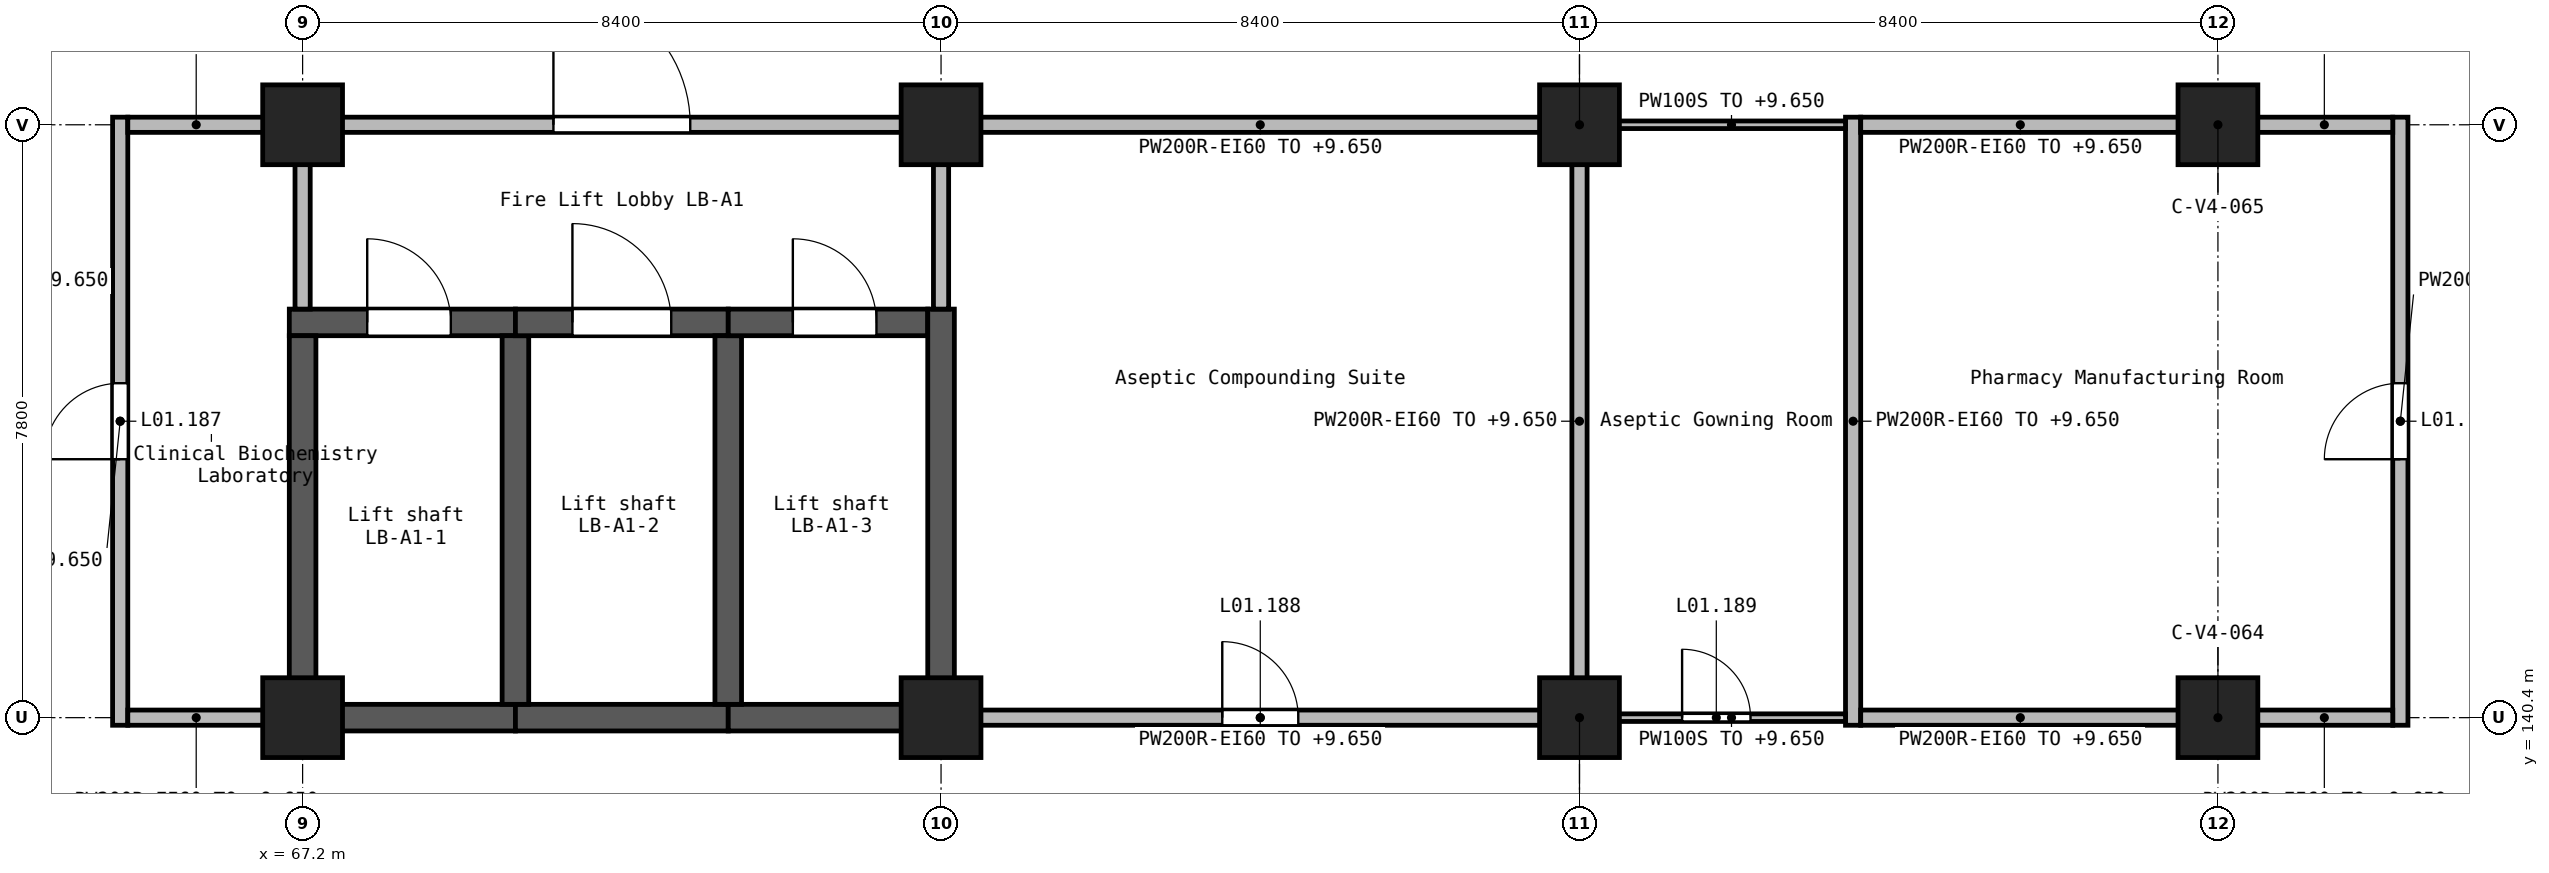
"""IFC4 building model, lengths in metres.
Left out: names, types, materials, properties, quantities, classifications, styles, units other than length and angle.
Written with IfcOpenShell. Run it as: python <this file> out.ifc"""

import sys

from ifc_helpers import new_model, si_unit, direction, frame, frame_2d, origin, origin_2d, place, context, subcontext, project, spatial, rectangle, extrude, element, fill, save


model = new_model("IFC4")
c1 = context("Model", 3, precision=1e-05, world=origin(), true_north=direction((0.0, 1.0)))
c2 = subcontext(c1, "Body", "Model", "MODEL_VIEW")
j1 = project(units=[si_unit("LENGTHUNIT", "METRE"), si_unit("PLANEANGLEUNIT", "RADIAN")], contexts=[c1])
p1 = place(None, origin())
s1 = spatial("IfcSite", under=j1, at=p1, CompositionType="ELEMENT")
p2 = place(p1, origin())
s2 = spatial("IfcBuilding", under=s1, at=p2, CompositionType="ELEMENT")
p3 = place(p2, frame((0.0, 0.0, 5.4)))
s3 = spatial("IfcBuildingStorey", under=s2, at=p3, CompositionType="ELEMENT", Elevation=5.4)
for number, where, z_axis, x_axis in (
    (1, (67.2, 140.4, 0.0), (0.0, 0.0, 1.0), (1.0, 0.0, 0.0)),
    (2, (67.2, 148.2, 0.0), (0.0, 0.0, 1.0), (1.0, 0.0, 0.0)),
    (3, (75.6, 140.4, 0.0), (0.0, 0.0, 1.0), (1.0, 0.0, 0.0)),
    (4, (75.6, 148.2, 0.0), (0.0, 0.0, 1.0), (1.0, 0.0, 0.0)),
    (5, (84.0, 140.4, 0.0), (0.0, 0.0, 1.0), (1.0, 0.0, 0.0)),
    (6, (84.0, 148.2, 0.0), (0.0, 0.0, 1.0), (1.0, 0.0, 0.0)),
    (7, (92.4, 140.4, 0.0), (0.0, 0.0, 1.0), (1.0, 0.0, 0.0)),
    (8, (92.4, 148.2, 0.0), (0.0, 0.0, 1.0), (1.0, 0.0, 0.0)),
):
    element("IfcColumn", number, at=place(p3, frame(where, z_axis=z_axis, x_axis=x_axis)), inside=s3, PredefinedType="COLUMN", context=c2, shape_type="SweptSolid", body=[
        extrude(rectangle(XDim=1.05, YDim=1.05, at=origin_2d()), origin(), (0.0, 0.0, 1.0), 4.5),
    ])
p4 = place(p3, frame((67.025, 145.6, 0.0), z_axis=(0.0, 0.0, 1.0), x_axis=(1.0, 0.0, 0.0)))
e9 = element("IfcWall", 9, at=p4, inside=s3, PredefinedType="SHEAR", context=c2, shape_type="SweptSolid", body=[
    extrude(rectangle(XDim=2.975, YDim=0.35, at=frame_2d((1.488, 0.0))), origin(), (0.0, 0.0, 1.0), 4.5),
])
p5 = place(p4, frame((1.025, 0.0, 0.0)))
e10 = element("IfcOpeningElement", 10, at=p5, cuts=e9, PredefinedType="OPENING", context=c2, shape_type="SweptSolid", body=[
    extrude(rectangle(XDim=1.1, YDim=2.1, at=frame_2d((0.55, 1.05))), frame((0.0, 0.185, 0.0), z_axis=(0.0, -1.0, 0.0), x_axis=(1.0, 0.0, 0.0)), (0.0, 0.0, 1.0), 0.37),
])
p6 = place(p3, frame((67.2, 140.225, 0.0), z_axis=(0.0, 0.0, 1.0), x_axis=(0.0, 1.0, 0.0)))
e11 = element("IfcWall", 11, at=p6, inside=s3, PredefinedType="SHEAR", context=c2, shape_type="SweptSolid", body=[
    extrude(rectangle(XDim=5.2, YDim=0.35, at=frame_2d((2.6, 0.0))), origin(), (0.0, 0.0, 1.0), 4.5),
])
p7 = place(p3, frame((67.375, 140.4, 0.0), z_axis=(0.0, 0.0, 1.0), x_axis=(1.0, 0.0, 0.0)))
e12 = element("IfcWall", 12, at=p7, inside=s3, PredefinedType="SHEAR", context=c2, shape_type="SweptSolid", body=[
    extrude(rectangle(XDim=2.625, YDim=0.35, at=frame_2d((1.312, 0.0))), origin(), (0.0, 0.0, 1.0), 4.5),
])
p8 = place(p3, frame((70.0, 140.4, 0.0), z_axis=(0.0, 0.0, 1.0), x_axis=(1.0, 0.0, 0.0)))
e13 = element("IfcWall", 13, at=p8, inside=s3, PredefinedType="SHEAR", context=c2, shape_type="SweptSolid", body=[
    extrude(rectangle(XDim=2.8, YDim=0.35, at=frame_2d((1.4, 0.0))), origin(), (0.0, 0.0, 1.0), 4.5),
])
p9 = place(p3, frame((70.0, 140.575, 0.0), z_axis=(0.0, 0.0, 1.0), x_axis=(0.0, 1.0, 0.0)))
e14 = element("IfcWall", 14, at=p9, inside=s3, PredefinedType="SHEAR", context=c2, shape_type="SweptSolid", body=[
    extrude(rectangle(XDim=4.85, YDim=0.35, at=frame_2d((2.425, 0.0))), origin(), (0.0, 0.0, 1.0), 4.5),
])
p10 = place(p3, frame((70.0, 145.6, 0.0), z_axis=(0.0, 0.0, 1.0), x_axis=(1.0, 0.0, 0.0)))
e15 = element("IfcWall", 15, at=p10, inside=s3, PredefinedType="SHEAR", context=c2, shape_type="SweptSolid", body=[
    extrude(rectangle(XDim=2.8, YDim=0.35, at=frame_2d((1.4, 0.0))), origin(), (0.0, 0.0, 1.0), 4.5),
])
p11 = place(p10, frame((0.75, 0.0, 0.0)))
e16 = element("IfcOpeningElement", 16, at=p11, cuts=e15, PredefinedType="OPENING", context=c2, shape_type="SweptSolid", body=[
    extrude(rectangle(XDim=1.3, YDim=2.1, at=frame_2d((0.65, 1.05))), frame((0.0, 0.185, 0.0), z_axis=(0.0, -1.0, 0.0), x_axis=(1.0, 0.0, 0.0)), (0.0, 0.0, 1.0), 0.37),
])
p12 = place(p3, frame((72.8, 140.4, 0.0), z_axis=(0.0, 0.0, 1.0), x_axis=(1.0, 0.0, 0.0)))
e17 = element("IfcWall", 17, at=p12, inside=s3, PredefinedType="SHEAR", context=c2, shape_type="SweptSolid", body=[
    extrude(rectangle(XDim=2.625, YDim=0.35, at=frame_2d((1.312, 0.0))), origin(), (0.0, 0.0, 1.0), 4.5),
])
p13 = place(p3, frame((72.8, 140.575, 0.0), z_axis=(0.0, 0.0, 1.0), x_axis=(0.0, 1.0, 0.0)))
e18 = element("IfcWall", 18, at=p13, inside=s3, PredefinedType="SHEAR", context=c2, shape_type="SweptSolid", body=[
    extrude(rectangle(XDim=4.85, YDim=0.35, at=frame_2d((2.425, 0.0))), origin(), (0.0, 0.0, 1.0), 4.5),
])
p14 = place(p3, frame((72.8, 145.6, 0.0), z_axis=(0.0, 0.0, 1.0), x_axis=(1.0, 0.0, 0.0)))
e19 = element("IfcWall", 19, at=p14, inside=s3, PredefinedType="SHEAR", context=c2, shape_type="SweptSolid", body=[
    extrude(rectangle(XDim=2.625, YDim=0.35, at=frame_2d((1.312, 0.0))), origin(), (0.0, 0.0, 1.0), 4.5),
])
p15 = place(p14, frame((0.85, 0.0, 0.0)))
e20 = element("IfcOpeningElement", 20, at=p15, cuts=e19, PredefinedType="OPENING", context=c2, shape_type="SweptSolid", body=[
    extrude(rectangle(XDim=1.1, YDim=2.1, at=frame_2d((0.55, 1.05))), frame((0.0, 0.185, 0.0), z_axis=(0.0, -1.0, 0.0), x_axis=(1.0, 0.0, 0.0)), (0.0, 0.0, 1.0), 0.37),
])
p16 = place(p3, frame((75.6, 140.225, 0.0), z_axis=(0.0, 0.0, 1.0), x_axis=(0.0, 1.0, 0.0)))
e21 = element("IfcWall", 21, at=p16, inside=s3, PredefinedType="SHEAR", context=c2, shape_type="SweptSolid", body=[
    extrude(rectangle(XDim=5.55, YDim=0.35, at=frame_2d((2.775, 0.0))), origin(), (0.0, 0.0, 1.0), 4.5),
])
p17 = place(p3, frame((76.1, 140.4, 0.0), z_axis=(0.0, 0.0, 1.0), x_axis=(1.0, 0.0, 0.0)))
e22 = element("IfcWall", 22, at=p17, inside=s3, PredefinedType="SOLIDWALL", context=c2, shape_type="SweptSolid", body=[
    extrude(rectangle(XDim=7.4, YDim=0.2, at=frame_2d((3.7, 0.0))), origin(), (0.0, 0.0, 1.0), 4.25),
])
p18 = place(p17, frame((3.2, 0.0, 0.0)))
e23 = element("IfcOpeningElement", 23, at=p18, cuts=e22, PredefinedType="OPENING", context=c2, shape_type="SweptSolid", body=[
    extrude(rectangle(XDim=1.0, YDim=2.1, at=frame_2d((0.5, 1.05))), frame((0.0, 0.11, 0.0), z_axis=(0.0, -1.0, 0.0), x_axis=(1.0, 0.0, 0.0)), (0.0, 0.0, 1.0), 0.22),
])
p19 = place(p3, frame((76.1, 148.2, 0.0), z_axis=(0.0, 0.0, 1.0), x_axis=(1.0, 0.0, 0.0)))
e24 = element("IfcWall", 24, at=p19, inside=s3, PredefinedType="SOLIDWALL", context=c2, shape_type="SweptSolid", body=[
    extrude(rectangle(XDim=7.4, YDim=0.2, at=frame_2d((3.7, 0.0))), origin(), (0.0, 0.0, 1.0), 4.25),
])
p20 = place(p3, frame((67.7, 148.2, 0.0), z_axis=(0.0, 0.0, 1.0), x_axis=(1.0, 0.0, 0.0)))
e25 = element("IfcWall", 25, at=p20, inside=s3, PredefinedType="SOLIDWALL", context=c2, shape_type="SweptSolid", body=[
    extrude(rectangle(XDim=7.4, YDim=0.2, at=frame_2d((3.7, 0.0))), origin(), (0.0, 0.0, 1.0), 4.25),
])
p21 = place(p20, frame((2.8, 0.0, 0.0)))
e26 = element("IfcOpeningElement", 26, at=p21, cuts=e25, PredefinedType="OPENING", context=c2, shape_type="SweptSolid", body=[
    extrude(rectangle(XDim=1.8, YDim=2.1, at=frame_2d((0.9, 1.05))), frame((0.0, 0.11, 0.0), z_axis=(0.0, -1.0, 0.0), x_axis=(1.0, 0.0, 0.0)), (0.0, 0.0, 1.0), 0.22),
])
p22 = place(p3, frame((64.8, 140.3, 0.0), z_axis=(0.0, 0.0, 1.0), x_axis=(0.0, 1.0, 0.0)))
e27 = element("IfcWall", 27, at=p22, inside=s3, PredefinedType="SOLIDWALL", context=c2, shape_type="SweptSolid", body=[
    extrude(rectangle(XDim=8.0, YDim=0.2, at=frame_2d((4.0, 0.0))), origin(), (0.0, 0.0, 1.0), 4.25),
])
p23 = place(p22, frame((3.5, 0.0, 0.0)))
e28 = element("IfcOpeningElement", 28, at=p23, cuts=e27, PredefinedType="OPENING", context=c2, shape_type="SweptSolid", body=[
    extrude(rectangle(XDim=1.0, YDim=2.1, at=frame_2d((0.5, 1.05))), frame((0.0, 0.11, 0.0), z_axis=(0.0, -1.0, 0.0), x_axis=(1.0, 0.0, 0.0)), (0.0, 0.0, 1.0), 0.22),
])
p24 = place(p3, frame((84.0, 140.9, 0.0), z_axis=(0.0, 0.0, 1.0), x_axis=(0.0, 1.0, 0.0)))
e29 = element("IfcWall", 29, at=p24, inside=s3, PredefinedType="SOLIDWALL", context=c2, shape_type="SweptSolid", body=[
    extrude(rectangle(XDim=6.8, YDim=0.2, at=frame_2d((3.4, 0.0))), origin(), (0.0, 0.0, 1.0), 4.25),
])
p25 = place(p3, frame((87.6, 140.3, 0.0), z_axis=(0.0, 0.0, 1.0), x_axis=(0.0, 1.0, 0.0)))
e30 = element("IfcWall", 30, at=p25, inside=s3, PredefinedType="SOLIDWALL", context=c2, shape_type="SweptSolid", body=[
    extrude(rectangle(XDim=8.0, YDim=0.2, at=frame_2d((4.0, 0.0))), origin(), (0.0, 0.0, 1.0), 4.25),
])
p26 = place(p3, frame((94.8, 140.3, 0.0), z_axis=(0.0, 0.0, 1.0), x_axis=(0.0, 1.0, 0.0)))
e31 = element("IfcWall", 31, at=p26, inside=s3, PredefinedType="SOLIDWALL", context=c2, shape_type="SweptSolid", body=[
    extrude(rectangle(XDim=8.0, YDim=0.2, at=frame_2d((4.0, 0.0))), origin(), (0.0, 0.0, 1.0), 4.25),
])
p27 = place(p26, frame((3.5, 0.0, 0.0)))
e32 = element("IfcOpeningElement", 32, at=p27, cuts=e31, PredefinedType="OPENING", context=c2, shape_type="SweptSolid", body=[
    extrude(rectangle(XDim=1.0, YDim=2.1, at=frame_2d((0.5, 1.05))), frame((0.0, 0.11, 0.0), z_axis=(0.0, -1.0, 0.0), x_axis=(1.0, 0.0, 0.0)), (0.0, 0.0, 1.0), 0.22),
])
p28 = place(p3, frame((87.7, 140.4, 0.0), z_axis=(0.0, 0.0, 1.0), x_axis=(1.0, 0.0, 0.0)))
e33 = element("IfcWall", 33, at=p28, inside=s3, PredefinedType="SOLIDWALL", context=c2, shape_type="SweptSolid", body=[
    extrude(rectangle(XDim=4.2, YDim=0.2, at=frame_2d((2.1, 0.0))), origin(), (0.0, 0.0, 1.0), 4.25),
])
p29 = place(p3, frame((92.9, 140.4, 0.0), z_axis=(0.0, 0.0, 1.0), x_axis=(1.0, 0.0, 0.0)))
e34 = element("IfcWall", 34, at=p29, inside=s3, PredefinedType="SOLIDWALL", context=c2, shape_type="SweptSolid", body=[
    extrude(rectangle(XDim=1.8, YDim=0.2, at=frame_2d((0.9, 0.0))), origin(), (0.0, 0.0, 1.0), 4.25),
])
p30 = place(p3, frame((87.7, 148.2, 0.0), z_axis=(0.0, 0.0, 1.0), x_axis=(1.0, 0.0, 0.0)))
e35 = element("IfcWall", 35, at=p30, inside=s3, PredefinedType="SOLIDWALL", context=c2, shape_type="SweptSolid", body=[
    extrude(rectangle(XDim=4.2, YDim=0.2, at=frame_2d((2.1, 0.0))), origin(), (0.0, 0.0, 1.0), 4.25),
])
p31 = place(p3, frame((92.9, 148.2, 0.0), z_axis=(0.0, 0.0, 1.0), x_axis=(1.0, 0.0, 0.0)))
e36 = element("IfcWall", 36, at=p31, inside=s3, PredefinedType="SOLIDWALL", context=c2, shape_type="SweptSolid", body=[
    extrude(rectangle(XDim=1.8, YDim=0.2, at=frame_2d((0.9, 0.0))), origin(), (0.0, 0.0, 1.0), 4.25),
])
for number, where, z_axis, x_axis in (
    (37, (67.2, 145.775, 0.0), (0.0, 0.0, 1.0), (0.0, 1.0, 0.0)),
    (38, (75.6, 145.775, 0.0), (0.0, 0.0, 1.0), (0.0, 1.0, 0.0)),
):
    element("IfcWall", number, at=place(p3, frame(where, z_axis=z_axis, x_axis=x_axis)), inside=s3, PredefinedType="SOLIDWALL", context=c2, shape_type="SweptSolid", body=[
        extrude(rectangle(XDim=1.925, YDim=0.2, at=frame_2d((0.962, 0.0))), origin(), (0.0, 0.0, 1.0), 4.25),
    ])
for number, where, z_axis, x_axis in (
    (39, (64.9, 140.4, 0.0), (0.0, 0.0, 1.0), (1.0, 0.0, 0.0)),
    (40, (64.9, 148.2, 0.0), (0.0, 0.0, 1.0), (1.0, 0.0, 0.0)),
):
    element("IfcWall", number, at=place(p3, frame(where, z_axis=z_axis, x_axis=x_axis)), inside=s3, PredefinedType="SOLIDWALL", context=c2, shape_type="SweptSolid", body=[
        extrude(rectangle(XDim=1.8, YDim=0.2, at=frame_2d((0.9, 0.0))), origin(), (0.0, 0.0, 1.0), 4.25),
    ])
p32 = place(p3, frame((84.5, 140.4, 0.0), z_axis=(0.0, 0.0, 1.0), x_axis=(1.0, 0.0, 0.0)))
e41 = element("IfcWall", 41, at=p32, inside=s3, PredefinedType="PARTITIONING", context=c2, shape_type="SweptSolid", body=[
    extrude(rectangle(XDim=3.0, YDim=0.1, at=frame_2d((1.5, 0.0))), origin(), (0.0, 0.0, 1.0), 4.25),
])
p33 = place(p32, frame((0.85, 0.0, 0.0)))
e42 = element("IfcOpeningElement", 42, at=p33, cuts=e41, PredefinedType="OPENING", context=c2, shape_type="SweptSolid", body=[
    extrude(rectangle(XDim=0.9, YDim=2.1, at=frame_2d((0.45, 1.05))), frame((0.0, 0.06, 0.0), z_axis=(0.0, -1.0, 0.0), x_axis=(1.0, 0.0, 0.0)), (0.0, 0.0, 1.0), 0.12),
])
p34 = place(p3, frame((84.5, 148.2, 0.0), z_axis=(0.0, 0.0, 1.0), x_axis=(1.0, 0.0, 0.0)))
e43 = element("IfcWall", 43, at=p34, inside=s3, PredefinedType="PARTITIONING", context=c2, shape_type="SweptSolid", body=[
    extrude(rectangle(XDim=3.0, YDim=0.1, at=frame_2d((1.5, 0.0))), origin(), (0.0, 0.0, 1.0), 4.25),
])
p35 = place(p21, frame((1.8, 0.0, 0.0), z_axis=(0.0, 0.0, 1.0), x_axis=(-1.0, 0.0, 0.0)))
e44 = element("IfcDoor", 44, at=p35, inside=s3, OperationType="DOUBLE_DOOR_SINGLE_SWING", PredefinedType="DOOR", context=c2, shape_type="SweptSolid", body=[
    extrude(rectangle(XDim=1.8, YDim=2.1, at=frame_2d((0.9, 1.05))), frame((0.0, 0.025, 0.0), z_axis=(0.0, -1.0, 0.0), x_axis=(1.0, 0.0, 0.0)), (0.0, 0.0, 1.0), 0.05),
])
fill(e26, e44)
p36 = place(p23, frame((1.0, 0.0, 0.0), z_axis=(0.0, 0.0, 1.0), x_axis=(-1.0, 0.0, 0.0)))
e45 = element("IfcDoor", 45, at=p36, inside=s3, OperationType="SINGLE_SWING_RIGHT", PredefinedType="DOOR", context=c2, shape_type="SweptSolid", body=[
    extrude(rectangle(XDim=1.0, YDim=2.1, at=frame_2d((0.5, 1.05))), frame((0.0, 0.025, 0.0), z_axis=(0.0, -1.0, 0.0), x_axis=(1.0, 0.0, 0.0)), (0.0, 0.0, 1.0), 0.05),
])
fill(e28, e45)
p37 = place(p18, origin())
e46 = element("IfcDoor", 46, at=p37, inside=s3, OperationType="SINGLE_SWING_LEFT", PredefinedType="DOOR", context=c2, shape_type="SweptSolid", body=[
    extrude(rectangle(XDim=1.0, YDim=2.1, at=frame_2d((0.5, 1.05))), frame((0.0, 0.025, 0.0), z_axis=(0.0, -1.0, 0.0), x_axis=(1.0, 0.0, 0.0)), (0.0, 0.0, 1.0), 0.05),
])
fill(e23, e46)
p38 = place(p33, origin())
e47 = element("IfcDoor", 47, at=p38, inside=s3, OperationType="SINGLE_SWING_LEFT", PredefinedType="DOOR", context=c2, shape_type="SweptSolid", body=[
    extrude(rectangle(XDim=0.9, YDim=2.1, at=frame_2d((0.45, 1.05))), frame((0.0, 0.025, 0.0), z_axis=(0.0, -1.0, 0.0), x_axis=(1.0, 0.0, 0.0)), (0.0, 0.0, 1.0), 0.05),
])
fill(e42, e47)
p39 = place(p27, origin())
e48 = element("IfcDoor", 48, at=p39, inside=s3, OperationType="SINGLE_SWING_LEFT", PredefinedType="DOOR", context=c2, shape_type="SweptSolid", body=[
    extrude(rectangle(XDim=1.0, YDim=2.1, at=frame_2d((0.5, 1.05))), frame((0.0, 0.025, 0.0), z_axis=(0.0, -1.0, 0.0), x_axis=(1.0, 0.0, 0.0)), (0.0, 0.0, 1.0), 0.05),
])
fill(e32, e48)
p40 = place(p5, origin())
e49 = element("IfcDoor", 49, at=p40, inside=s3, OperationType="DOUBLE_DOOR_SLIDING", PredefinedType="DOOR", context=c2, shape_type="SweptSolid", body=[
    extrude(rectangle(XDim=1.1, YDim=2.1, at=frame_2d((0.55, 1.05))), frame((0.0, 0.025, 0.0), z_axis=(0.0, -1.0, 0.0), x_axis=(1.0, 0.0, 0.0)), (0.0, 0.0, 1.0), 0.05),
])
fill(e10, e49)
p41 = place(p11, origin())
e50 = element("IfcDoor", 50, at=p41, inside=s3, OperationType="DOUBLE_DOOR_SLIDING", PredefinedType="DOOR", context=c2, shape_type="SweptSolid", body=[
    extrude(rectangle(XDim=1.3, YDim=2.1, at=frame_2d((0.65, 1.05))), frame((0.0, 0.025, 0.0), z_axis=(0.0, -1.0, 0.0), x_axis=(1.0, 0.0, 0.0)), (0.0, 0.0, 1.0), 0.05),
])
fill(e16, e50)
p42 = place(p15, origin())
e51 = element("IfcDoor", 51, at=p42, inside=s3, OperationType="DOUBLE_DOOR_SLIDING", PredefinedType="DOOR", context=c2, shape_type="SweptSolid", body=[
    extrude(rectangle(XDim=1.1, YDim=2.1, at=frame_2d((0.55, 1.05))), frame((0.0, 0.025, 0.0), z_axis=(0.0, -1.0, 0.0), x_axis=(1.0, 0.0, 0.0)), (0.0, 0.0, 1.0), 0.05),
])
fill(e20, e51)
save(model, sys.argv[1])
